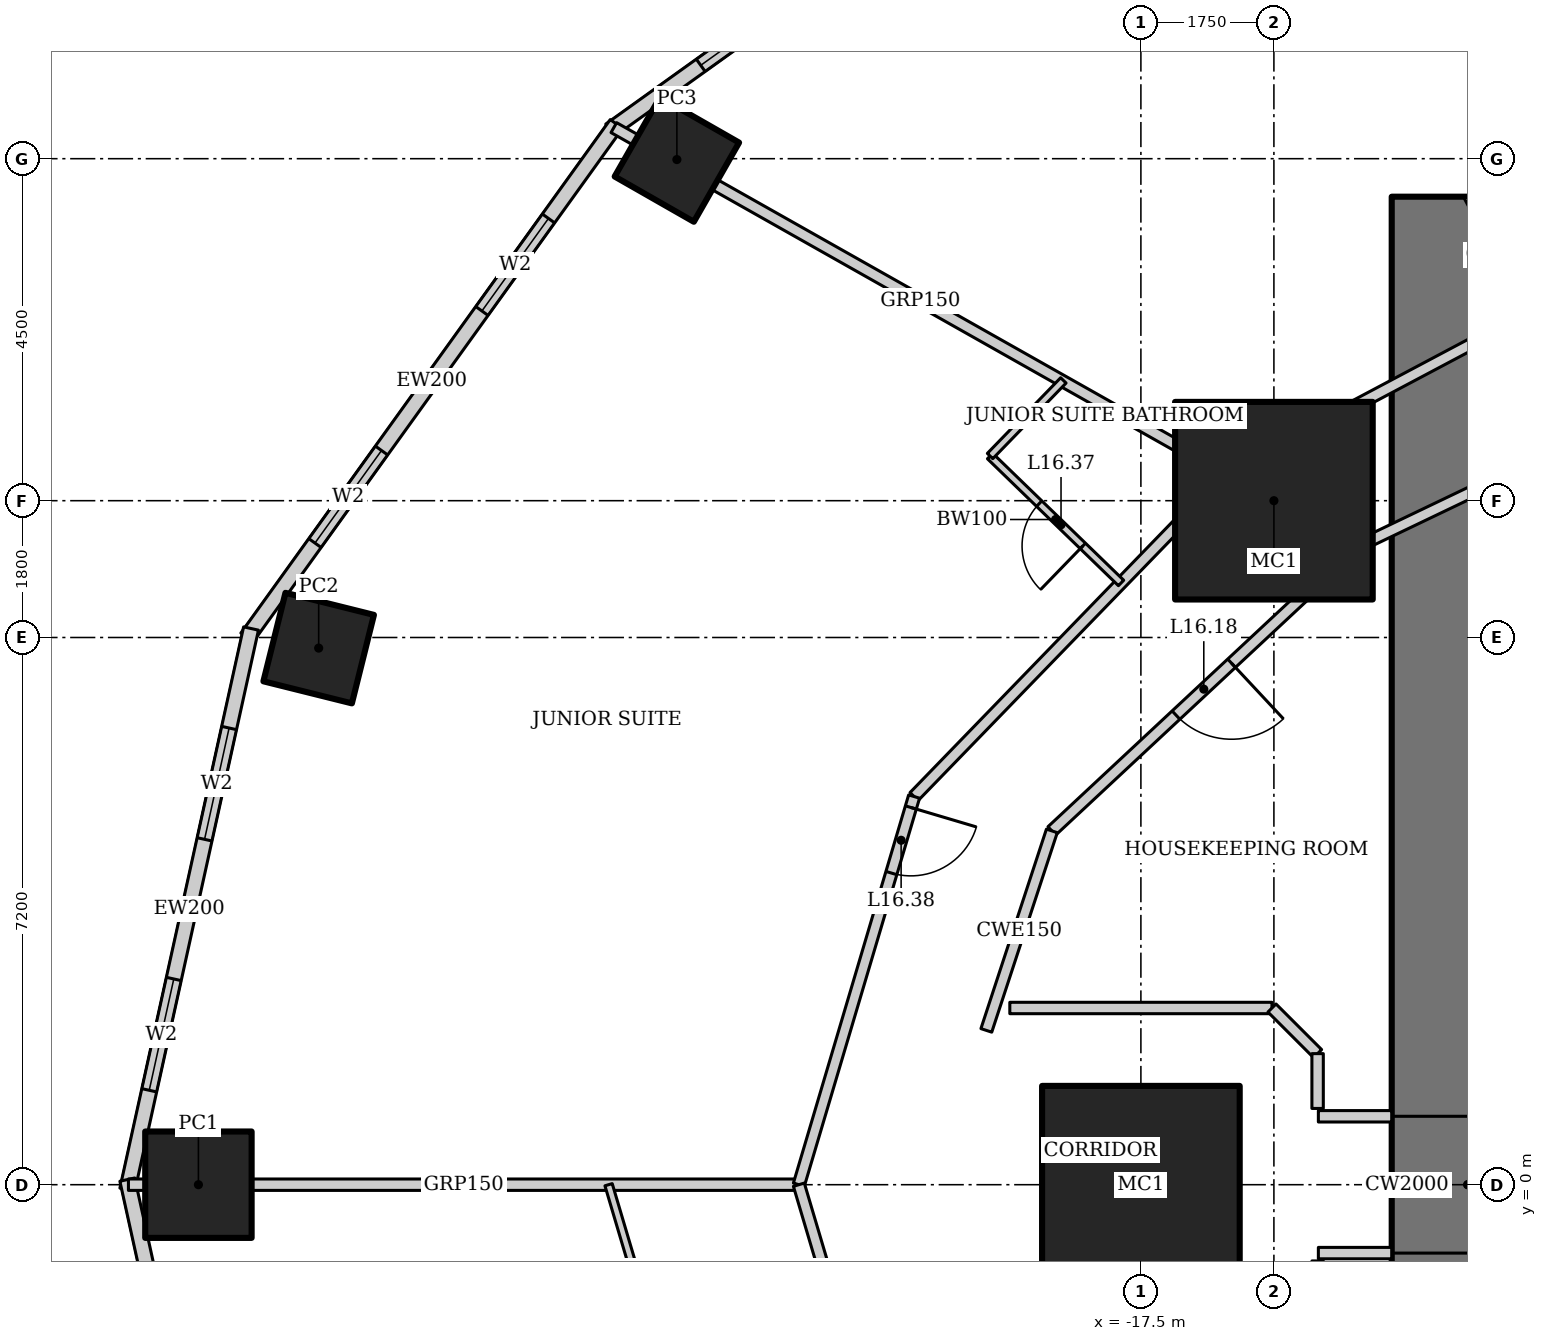
"""IFC4 building model, lengths in metres.
Left out: names, types, materials, properties, quantities, classifications, styles, units other than length and angle.
Written with IfcOpenShell. Run it as: python <this file> out.ifc"""

import sys

from ifc_helpers import new_model, si_unit, direction, frame, frame_2d, origin, origin_2d, place, context, subcontext, project, spatial, rectangle, hollow_rectangle, extrude, element, fill, save


model = new_model("IFC4")
c1 = context("Model", 3, precision=1e-05, world=origin(), true_north=direction((0.0, 1.0)))
c2 = subcontext(c1, "Body", "Model", "MODEL_VIEW")
j1 = project(units=[si_unit("LENGTHUNIT", "METRE"), si_unit("PLANEANGLEUNIT", "RADIAN")], contexts=[c1])
p1 = place(None, origin())
s1 = spatial("IfcSite", under=j1, at=p1, CompositionType="ELEMENT")
p2 = place(p1, origin())
s2 = spatial("IfcBuilding", under=s1, at=p2, CompositionType="ELEMENT")
p3 = place(p2, frame((0.0, 0.0, 73.0)))
s3 = spatial("IfcBuildingStorey", under=s2, at=p3, CompositionType="ELEMENT", Elevation=73.0)
for number, where, z_axis, x_axis in (
    (1, (-15.75, 9.0, 0.0), (0.0, 0.0, 1.0), (1.0, 0.0, 0.0)),
    (2, (-17.5, 0.0, 0.0), (0.0, 0.0, 1.0), (1.0, 0.0, 0.0)),
):
    element("IfcColumn", number, at=place(p3, frame(where, z_axis=z_axis, x_axis=x_axis)), inside=s3, PredefinedType="COLUMN", context=c2, shape_type="SweptSolid", body=[
        extrude(hollow_rectangle(XDim=2.6, YDim=2.6, WallThickness=0.13, at=origin_2d()), origin(), (0.0, 0.0, 1.0), 3.6),
    ])
p4 = place(p3, frame((-23.605, 13.489, 0.0), z_axis=(0.0, 0.0, 1.0), x_axis=(0.496139221777, 0.86824298017, 0.0)))
e3 = element("IfcColumn", 3, at=p4, inside=s3, PredefinedType="COLUMN", context=c2, shape_type="SweptSolid", body=[
    extrude(hollow_rectangle(XDim=1.2, YDim=1.2, WallThickness=0.12, at=origin_2d()), origin(), (0.0, 0.0, 1.0), 3.6),
])
p5 = place(p3, frame((-28.318, 7.06, 0.0), z_axis=(0.0, 0.0, 1.0), x_axis=(0.2419218956, 0.970295726276, 0.0)))
e4 = element("IfcColumn", 4, at=p5, inside=s3, PredefinedType="COLUMN", context=c2, shape_type="SweptSolid", body=[
    extrude(hollow_rectangle(XDim=1.2, YDim=1.2, WallThickness=0.1, at=origin_2d()), origin(), (0.0, 0.0, 1.0), 3.6),
])
p6 = place(p3, frame((-29.9, 0.0, 0.0), z_axis=(0.0, 0.0, 1.0), x_axis=(1.0, 0.0, 0.0)))
e5 = element("IfcColumn", 5, at=p6, inside=s3, PredefinedType="COLUMN", context=c2, shape_type="SweptSolid", body=[
    extrude(hollow_rectangle(XDim=1.4, YDim=1.4, WallThickness=0.1, at=origin_2d()), origin(), (0.0, 0.0, 1.0), 3.6),
])
p7 = place(p3, frame((-13.2, 13.0, 0.0), z_axis=(0.0, 0.0, 1.0), x_axis=(0.0, -1.0, 0.0)))
e6 = element("IfcWall", 6, at=p7, inside=s3, PredefinedType="SHEAR", context=c2, shape_type="SweptSolid", body=[
    extrude(rectangle(XDim=26.0, YDim=2.0, at=frame_2d((13.0, 0.0))), origin(), (0.0, 0.0, 1.0), 3.6),
])
p8 = place(p7, frame((12.1, 0.0, 0.0)))
e7 = element("IfcOpeningElement", 7, at=p8, cuts=e6, PredefinedType="OPENING", context=c2, shape_type="SweptSolid", body=[
    extrude(rectangle(XDim=1.8, YDim=2.1, at=frame_2d((0.9, 1.05))), frame((0.0, 1.01, 0.0), z_axis=(0.0, -1.0, 0.0), x_axis=(1.0, 0.0, 0.0)), (0.0, 0.0, 1.0), 2.02),
])
p9 = place(p3, frame((-17.929, 18.572, 0.0), z_axis=(0.0, 0.0, 1.0), x_axis=(-0.812791321576, -0.582554948112, 0.0)))
e8 = element("IfcWall", 8, at=p9, inside=s3, PredefinedType="SOLIDWALL", context=c2, shape_type="SweptSolid", body=[
    extrude(rectangle(XDim=8.063, YDim=0.2, at=frame_2d((4.032, 0.0))), origin(), (0.0, 0.0, 1.0), 3.45),
])
p10 = place(p9, frame((1.466, 0.0, 0.5)))
e9 = element("IfcOpeningElement", 9, at=p10, cuts=e8, PredefinedType="OPENING", context=c2, shape_type="SweptSolid", body=[
    extrude(rectangle(XDim=1.5, YDim=2.2, at=frame_2d((0.75, 1.1))), frame((0.0, 0.11, 0.0), z_axis=(0.0, -1.0, 0.0), x_axis=(1.0, 0.0, 0.0)), (0.0, 0.0, 1.0), 0.22),
])
p11 = place(p9, frame((5.097, 0.0, 0.5)))
e10 = element("IfcOpeningElement", 10, at=p11, cuts=e8, PredefinedType="OPENING", context=c2, shape_type="SweptSolid", body=[
    extrude(rectangle(XDim=1.5, YDim=2.2, at=frame_2d((0.75, 1.1))), frame((0.0, 0.11, 0.0), z_axis=(0.0, -1.0, 0.0), x_axis=(1.0, 0.0, 0.0)), (0.0, 0.0, 1.0), 0.22),
])
p12 = place(p3, frame((-24.4, 13.957, 0.0), z_axis=(0.0, 0.0, 1.0), x_axis=(-0.583937613703, -0.811798536155, 0.0)))
e11 = element("IfcWall", 11, at=p12, inside=s3, PredefinedType="SOLIDWALL", context=c2, shape_type="SweptSolid", body=[
    extrude(rectangle(XDim=8.323, YDim=0.2, at=frame_2d((4.162, 0.0))), origin(), (0.0, 0.0, 1.0), 3.45),
])
p13 = place(p12, frame((1.531, 0.0, 0.5)))
e12 = element("IfcOpeningElement", 12, at=p13, cuts=e11, PredefinedType="OPENING", context=c2, shape_type="SweptSolid", body=[
    extrude(rectangle(XDim=1.5, YDim=2.2, at=frame_2d((0.75, 1.1))), frame((0.0, 0.11, 0.0), z_axis=(0.0, -1.0, 0.0), x_axis=(1.0, 0.0, 0.0)), (0.0, 0.0, 1.0), 0.22),
])
p14 = place(p12, frame((5.292, 0.0, 0.5)))
e13 = element("IfcOpeningElement", 13, at=p14, cuts=e11, PredefinedType="OPENING", context=c2, shape_type="SweptSolid", body=[
    extrude(rectangle(XDim=1.5, YDim=2.2, at=frame_2d((0.75, 1.1))), frame((0.0, 0.11, 0.0), z_axis=(0.0, -1.0, 0.0), x_axis=(1.0, 0.0, 0.0)), (0.0, 0.0, 1.0), 0.22),
])
p15 = place(p3, frame((-29.208, 7.318, 0.0), z_axis=(0.0, 0.0, 1.0), x_axis=(-0.215238065514, -0.976561608478, 0.0)))
e14 = element("IfcWall", 14, at=p15, inside=s3, PredefinedType="SOLIDWALL", context=c2, shape_type="SweptSolid", body=[
    extrude(rectangle(XDim=7.562, YDim=0.2, at=frame_2d((3.781, 0.0))), origin(), (0.0, 0.0, 1.0), 3.45),
])
p16 = place(p15, frame((1.341, 0.0, 0.5)))
e15 = element("IfcOpeningElement", 15, at=p16, cuts=e14, PredefinedType="OPENING", context=c2, shape_type="SweptSolid", body=[
    extrude(rectangle(XDim=1.5, YDim=2.2, at=frame_2d((0.75, 1.1))), frame((0.0, 0.11, 0.0), z_axis=(0.0, -1.0, 0.0), x_axis=(1.0, 0.0, 0.0)), (0.0, 0.0, 1.0), 0.22),
])
p17 = place(p15, frame((4.722, 0.0, 0.5)))
e16 = element("IfcOpeningElement", 16, at=p17, cuts=e14, PredefinedType="OPENING", context=c2, shape_type="SweptSolid", body=[
    extrude(rectangle(XDim=1.5, YDim=2.2, at=frame_2d((0.75, 1.1))), frame((0.0, 0.11, 0.0), z_axis=(0.0, -1.0, 0.0), x_axis=(1.0, 0.0, 0.0)), (0.0, 0.0, 1.0), 0.22),
])
p18 = place(p3, frame((-30.835, 0.067, 0.0), z_axis=(0.0, 0.0, 1.0), x_axis=(0.215238065514, -0.976561608478, 0.0)))
e17 = element("IfcWall", 17, at=p18, inside=s3, PredefinedType="SOLIDWALL", context=c2, shape_type="SweptSolid", body=[
    extrude(rectangle(XDim=7.562, YDim=0.2, at=frame_2d((3.781, 0.0))), origin(), (0.0, 0.0, 1.0), 3.45),
])
p19 = place(p18, frame((1.341, 0.0, 0.5)))
e18 = element("IfcOpeningElement", 18, at=p19, cuts=e17, PredefinedType="OPENING", context=c2, shape_type="SweptSolid", body=[
    extrude(rectangle(XDim=1.5, YDim=2.2, at=frame_2d((0.75, 1.1))), frame((0.0, 0.11, 0.0), z_axis=(0.0, -1.0, 0.0), x_axis=(1.0, 0.0, 0.0)), (0.0, 0.0, 1.0), 0.22),
])
p20 = place(p18, frame((4.722, 0.0, 0.5)))
e19 = element("IfcOpeningElement", 19, at=p20, cuts=e17, PredefinedType="OPENING", context=c2, shape_type="SweptSolid", body=[
    extrude(rectangle(XDim=1.5, YDim=2.2, at=frame_2d((0.75, 1.1))), frame((0.0, 0.11, 0.0), z_axis=(0.0, -1.0, 0.0), x_axis=(1.0, 0.0, 0.0)), (0.0, 0.0, 1.0), 0.22),
])
p21 = place(p3, frame((-24.435, 13.909, 0.0), z_axis=(0.0, 0.0, 1.0), x_axis=(0.870744406136, -0.491735883563, 0.0)))
e20 = element("IfcWall", 20, at=p21, inside=s3, PredefinedType="PARTITIONING", context=c2, shape_type="SweptSolid", body=[
    extrude(rectangle(XDim=9.263, YDim=0.15, at=frame_2d((4.631, 0.0))), origin(), (0.0, 0.0, 1.0), 2.693),
])
p22 = place(p3, frame((-30.821, 0.0, 0.0), z_axis=(0.0, 0.0, 1.0), x_axis=(1.0, 0.0, 0.0)))
e21 = element("IfcWall", 21, at=p22, inside=s3, PredefinedType="PARTITIONING", context=c2, shape_type="SweptSolid", body=[
    extrude(rectangle(XDim=8.821, YDim=0.15, at=frame_2d((4.41, 0.0))), origin(), (0.0, 0.0, 1.0), 2.528),
])
p23 = place(p3, frame((-11.519, 11.928, 0.0), z_axis=(0.0, 0.0, 1.0), x_axis=(-0.883334368785, -0.468743419071, 0.0)))
e22 = element("IfcWall", 22, at=p23, inside=s3, PredefinedType="PARTITIONING", context=c2, shape_type="SweptSolid", body=[
    extrude(rectangle(XDim=5.491, YDim=0.15, at=frame_2d((2.746, 0.0))), origin(), (0.0, 0.0, 1.0), 3.45),
])
p24 = place(p3, frame((-16.369, 9.354, 0.0), z_axis=(0.0, 0.0, 1.0), x_axis=(-0.695871090686, -0.71816671125, 0.0)))
e23 = element("IfcWall", 23, at=p24, inside=s3, PredefinedType="PARTITIONING", context=c2, shape_type="SweptSolid", body=[
    extrude(rectangle(XDim=5.913, YDim=0.15, at=frame_2d((2.957, 0.0))), origin(), (0.0, 0.0, 1.0), 3.45),
])
p25 = place(p3, frame((-20.484, 5.107, 0.0), z_axis=(0.0, 0.0, 1.0), x_axis=(-0.284584469409, -0.95865096869, 0.0)))
e24 = element("IfcWall", 24, at=p25, inside=s3, PredefinedType="PARTITIONING", context=c2, shape_type="SweptSolid", body=[
    extrude(rectangle(XDim=5.327, YDim=0.15, at=frame_2d((2.664, 0.0))), origin(), (0.0, 0.0, 1.0), 3.45),
])
p26 = place(p25, frame((0.15, 0.0, 0.0)))
e25 = element("IfcOpeningElement", 25, at=p26, cuts=e24, PredefinedType="OPENING", context=c2, shape_type="SweptSolid", body=[
    extrude(rectangle(XDim=0.9, YDim=2.1, at=frame_2d((0.45, 1.05))), frame((0.0, 0.085, 0.0), z_axis=(0.0, -1.0, 0.0), x_axis=(1.0, 0.0, 0.0)), (0.0, 0.0, 1.0), 0.17),
])
p27 = place(p3, frame((-22.0, 0.0, 0.0), z_axis=(0.0, 0.0, 1.0), x_axis=(0.284584469409, -0.95865096869, 0.0)))
e26 = element("IfcWall", 26, at=p27, inside=s3, PredefinedType="PARTITIONING", context=c2, shape_type="SweptSolid", body=[
    extrude(rectangle(XDim=5.327, YDim=0.15, at=frame_2d((2.664, 0.0))), origin(), (0.0, 0.0, 1.0), 3.45),
])
p28 = place(p3, frame((-10.177, 10.539, 0.0), z_axis=(0.0, 0.0, 1.0), x_axis=(-0.901869692799, -0.43200816799, 0.0)))
e27 = element("IfcWall", 27, at=p28, inside=s3, PredefinedType="PARTITIONING", context=c2, shape_type="SweptSolid", body=[
    extrude(rectangle(XDim=4.986, YDim=0.15, at=frame_2d((2.493, 0.0))), origin(), (0.0, 0.0, 1.0), 3.45),
])
p29 = place(p3, frame((-14.673, 8.385, 0.0), z_axis=(0.0, 0.0, 1.0), x_axis=(-0.731260145007, -0.682098673452, 0.0)))
e28 = element("IfcWall", 28, at=p29, inside=s3, PredefinedType="PARTITIONING", context=c2, shape_type="SweptSolid", body=[
    extrude(rectangle(XDim=5.468, YDim=0.15, at=frame_2d((2.734, 0.0))), origin(), (0.0, 0.0, 1.0), 3.45),
])
p30 = place(p29, frame((2.234, 0.0, 0.0)))
e29 = element("IfcOpeningElement", 29, at=p30, cuts=e28, PredefinedType="OPENING", context=c2, shape_type="SweptSolid", body=[
    extrude(rectangle(XDim=1.0, YDim=2.1, at=frame_2d((0.5, 1.05))), frame((0.0, 0.085, 0.0), z_axis=(0.0, -1.0, 0.0), x_axis=(1.0, 0.0, 0.0)), (0.0, 0.0, 1.0), 0.17),
])
p31 = place(p3, frame((-17.761, 7.917, 0.0), z_axis=(0.0, 0.0, 1.0), x_axis=(-0.718157610206, 0.695880483204, 0.0)))
e30 = element("IfcWall", 30, at=p31, inside=s3, PredefinedType="PARTITIONING", context=c2, shape_type="SweptSolid", body=[
    extrude(rectangle(XDim=2.4, YDim=0.1, at=frame_2d((1.2, 0.0))), origin(), (0.0, 0.0, 1.0), 3.45),
])
p32 = place(p31, frame((0.7, 0.0, 0.0)))
e31 = element("IfcOpeningElement", 31, at=p32, cuts=e30, PredefinedType="OPENING", context=c2, shape_type="SweptSolid", body=[
    extrude(rectangle(XDim=0.8, YDim=2.1, at=frame_2d((0.4, 1.05))), frame((0.0, 0.06, 0.0), z_axis=(0.0, -1.0, 0.0), x_axis=(1.0, 0.0, 0.0)), (0.0, 0.0, 1.0), 0.12),
])
p33 = place(p3, frame((-19.484, 9.588, 0.0), z_axis=(0.0, 0.0, 1.0), x_axis=(0.695920174922, 0.718119147591, 0.0)))
e32 = element("IfcWall", 32, at=p33, inside=s3, PredefinedType="PARTITIONING", context=c2, shape_type="SweptSolid", body=[
    extrude(rectangle(XDim=1.386, YDim=0.1, at=frame_2d((0.693, 0.0))), origin(), (0.0, 0.0, 1.0), 3.45),
])
p34 = place(p3, frame((-23.732, -2.6, 0.0), z_axis=(0.0, 0.0, 1.0), x_axis=(-0.284514277473, 0.958671803025, 0.0)))
e33 = element("IfcWall", 33, at=p34, inside=s3, PredefinedType="PARTITIONING", context=c2, shape_type="SweptSolid", body=[
    extrude(rectangle(XDim=2.712, YDim=0.1, at=frame_2d((1.356, 0.0))), origin(), (0.0, 0.0, 1.0), 3.45),
])
p35 = place(p3, frame((-13.2, 13.0, 0.0), z_axis=(0.0, 0.0, 1.0), x_axis=(0.46874717052, -0.88333237806, 0.0)))
e34 = element("IfcWall", 34, at=p35, inside=s3, PredefinedType="PARTITIONING", context=c2, shape_type="SweptSolid", body=[
    extrude(rectangle(XDim=1.735, YDim=0.1, at=frame_2d((0.868, 0.0))), origin(), (0.0, 0.0, 1.0), 3.45),
])
p36 = place(p3, frame((-18.672, 4.655, 0.0), z_axis=(0.0, 0.0, 1.0), x_axis=(-0.311929965981, -0.950105097515, 0.0)))
e35 = element("IfcWall", 35, at=p36, inside=s3, PredefinedType="PARTITIONING", context=c2, shape_type="SweptSolid", body=[
    extrude(rectangle(XDim=2.763, YDim=0.15, at=frame_2d((1.381, 0.0))), origin(), (0.0, 0.0, 1.0), 3.45),
])
for number, where, z_axis, x_axis in (
    (36, (-14.2, -0.9, 0.0), (0.0, 0.0, 1.0), (-1.0, 0.0, 0.0)),
    (37, (-14.2, 0.9, 0.0), (0.0, 0.0, 1.0), (-1.0, 0.0, 0.0)),
):
    element("IfcWall", number, at=place(p3, frame(where, z_axis=z_axis, x_axis=x_axis)), inside=s3, PredefinedType="PARTITIONING", context=c2, shape_type="SweptSolid", body=[
        extrude(rectangle(XDim=0.965, YDim=0.15, at=frame_2d((0.482, 0.0))), origin(), (0.0, 0.0, 1.0), 3.45),
    ])
p37 = place(p3, frame((-19.225, 2.325, 0.0), z_axis=(0.0, 0.0, 1.0), x_axis=(1.0, 0.0, 0.0)))
e38 = element("IfcWall", 38, at=p37, inside=s3, PredefinedType="PARTITIONING", context=c2, shape_type="SweptSolid", body=[
    extrude(rectangle(XDim=3.449, YDim=0.15, at=frame_2d((1.725, 0.0))), origin(), (0.0, 0.0, 1.0), 3.45),
])
p38 = place(p3, frame((-15.775, 2.325, 0.0), z_axis=(0.0, 0.0, 1.0), x_axis=(0.707106781187, -0.707106781187, 0.0)))
e39 = element("IfcWall", 39, at=p38, inside=s3, PredefinedType="PARTITIONING", context=c2, shape_type="SweptSolid", body=[
    extrude(rectangle(XDim=0.849, YDim=0.15, at=frame_2d((0.425, 0.0))), origin(), (0.0, 0.0, 1.0), 3.45),
])
p39 = place(p3, frame((-15.175, 1.725, 0.0), z_axis=(0.0, 0.0, 1.0), x_axis=(0.0, -1.0, 0.0)))
e40 = element("IfcWall", 40, at=p39, inside=s3, PredefinedType="PARTITIONING", context=c2, shape_type="SweptSolid", body=[
    extrude(rectangle(XDim=0.721, YDim=0.15, at=frame_2d((0.361, 0.0))), origin(), (0.0, 0.0, 1.0), 3.45),
])
p40 = place(p11, origin())
e41 = element("IfcWindow", 41, at=p40, inside=s3, PartitioningType="SINGLE_PANEL", PredefinedType="WINDOW", context=c2, shape_type="SweptSolid", body=[
    extrude(rectangle(XDim=1.5, YDim=2.2, at=frame_2d((0.75, 1.1))), frame((0.0, 0.03, 0.0), z_axis=(0.0, -1.0, 0.0), x_axis=(1.0, 0.0, 0.0)), (0.0, 0.0, 1.0), 0.06),
])
fill(e10, e41)
p41 = place(p13, origin())
e42 = element("IfcWindow", 42, at=p41, inside=s3, PartitioningType="SINGLE_PANEL", PredefinedType="WINDOW", context=c2, shape_type="SweptSolid", body=[
    extrude(rectangle(XDim=1.5, YDim=2.2, at=frame_2d((0.75, 1.1))), frame((0.0, 0.03, 0.0), z_axis=(0.0, -1.0, 0.0), x_axis=(1.0, 0.0, 0.0)), (0.0, 0.0, 1.0), 0.06),
])
fill(e12, e42)
p42 = place(p14, origin())
e43 = element("IfcWindow", 43, at=p42, inside=s3, PartitioningType="SINGLE_PANEL", PredefinedType="WINDOW", context=c2, shape_type="SweptSolid", body=[
    extrude(rectangle(XDim=1.5, YDim=2.2, at=frame_2d((0.75, 1.1))), frame((0.0, 0.03, 0.0), z_axis=(0.0, -1.0, 0.0), x_axis=(1.0, 0.0, 0.0)), (0.0, 0.0, 1.0), 0.06),
])
fill(e13, e43)
p43 = place(p16, origin())
e44 = element("IfcWindow", 44, at=p43, inside=s3, PartitioningType="SINGLE_PANEL", PredefinedType="WINDOW", context=c2, shape_type="SweptSolid", body=[
    extrude(rectangle(XDim=1.5, YDim=2.2, at=frame_2d((0.75, 1.1))), frame((0.0, 0.03, 0.0), z_axis=(0.0, -1.0, 0.0), x_axis=(1.0, 0.0, 0.0)), (0.0, 0.0, 1.0), 0.06),
])
fill(e15, e44)
p44 = place(p17, origin())
e45 = element("IfcWindow", 45, at=p44, inside=s3, PartitioningType="SINGLE_PANEL", PredefinedType="WINDOW", context=c2, shape_type="SweptSolid", body=[
    extrude(rectangle(XDim=1.5, YDim=2.2, at=frame_2d((0.75, 1.1))), frame((0.0, 0.03, 0.0), z_axis=(0.0, -1.0, 0.0), x_axis=(1.0, 0.0, 0.0)), (0.0, 0.0, 1.0), 0.06),
])
fill(e16, e45)
p45 = place(p8, origin())
e46 = element("IfcDoor", 46, at=p45, inside=s3, OperationType="DOUBLE_DOOR_DOUBLE_SWING", PredefinedType="DOOR", context=c2, shape_type="SweptSolid", body=[
    extrude(rectangle(XDim=1.8, YDim=2.1, at=frame_2d((0.9, 1.05))), frame((0.0, 0.025, 0.0), z_axis=(0.0, -1.0, 0.0), x_axis=(1.0, 0.0, 0.0)), (0.0, 0.0, 1.0), 0.05),
])
fill(e7, e46)
p46 = place(p30, origin())
e47 = element("IfcDoor", 47, at=p46, inside=s3, OperationType="SINGLE_SWING_LEFT", PredefinedType="DOOR", context=c2, shape_type="SweptSolid", body=[
    extrude(rectangle(XDim=1.0, YDim=2.1, at=frame_2d((0.5, 1.05))), frame((0.0, 0.025, 0.0), z_axis=(0.0, -1.0, 0.0), x_axis=(1.0, 0.0, 0.0)), (0.0, 0.0, 1.0), 0.05),
])
fill(e29, e47)
p47 = place(p32, origin())
e48 = element("IfcDoor", 48, at=p47, inside=s3, OperationType="SINGLE_SWING_LEFT", PredefinedType="DOOR", context=c2, shape_type="SweptSolid", body=[
    extrude(rectangle(XDim=0.8, YDim=2.1, at=frame_2d((0.4, 1.05))), frame((0.0, 0.025, 0.0), z_axis=(0.0, -1.0, 0.0), x_axis=(1.0, 0.0, 0.0)), (0.0, 0.0, 1.0), 0.05),
])
fill(e31, e48)
p48 = place(p26, origin())
e49 = element("IfcDoor", 49, at=p48, inside=s3, OperationType="SINGLE_SWING_LEFT", PredefinedType="DOOR", context=c2, shape_type="SweptSolid", body=[
    extrude(rectangle(XDim=0.9, YDim=2.1, at=frame_2d((0.45, 1.05))), frame((0.0, 0.025, 0.0), z_axis=(0.0, -1.0, 0.0), x_axis=(1.0, 0.0, 0.0)), (0.0, 0.0, 1.0), 0.05),
])
fill(e25, e49)
save(model, sys.argv[1])
